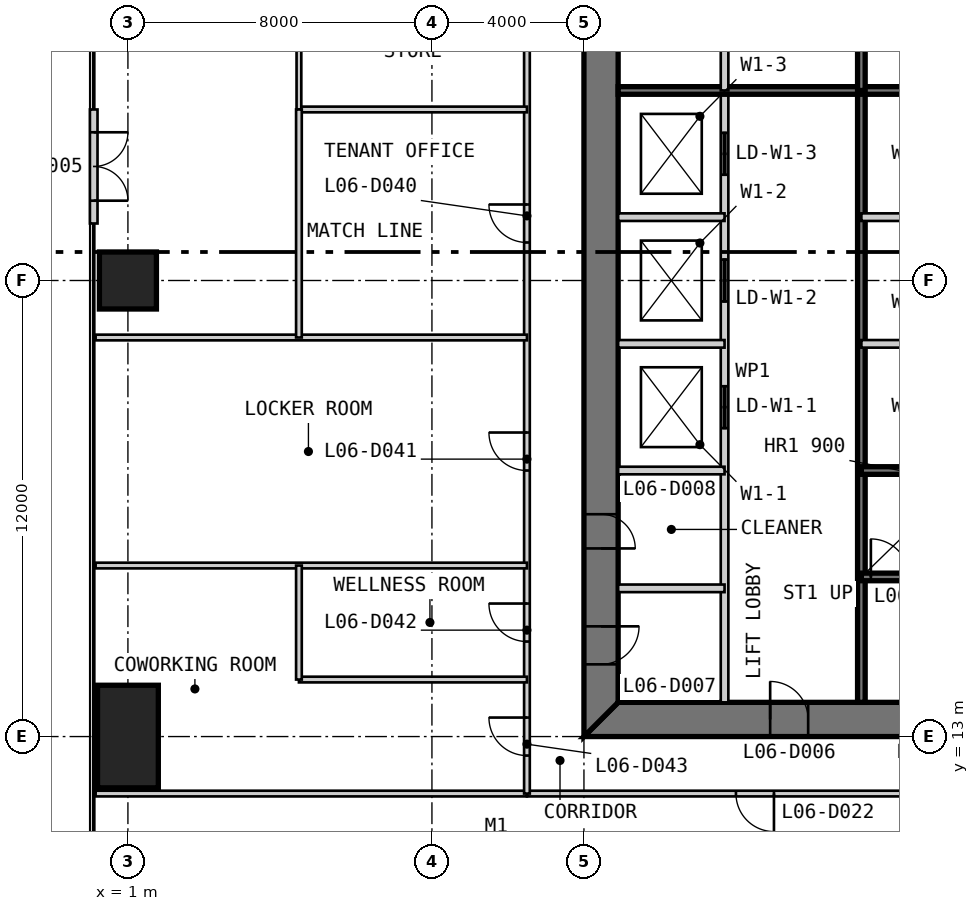
"""IFC4 building model, lengths in metres.
Left out: names, types, materials, properties, quantities, classifications, styles, units other than length and angle.
Written with IfcOpenShell. Run it as: python <this file> out.ifc"""

import sys

from ifc_helpers import new_model, si_unit, direction, frame, frame_2d, origin, origin_2d, place, context, subcontext, project, spatial, polyline, rectangle, outline, extrude, element, fill, save


model = new_model("IFC4")
c1 = context("Model", 3, precision=1e-05, world=origin(), true_north=direction((0.0, 1.0)))
c2 = subcontext(c1, "Body", "Model", "MODEL_VIEW")
j1 = project(units=[si_unit("LENGTHUNIT", "METRE"), si_unit("PLANEANGLEUNIT", "RADIAN")], contexts=[c1])
p1 = place(None, origin())
s1 = spatial("IfcSite", under=j1, at=p1, CompositionType="ELEMENT")
p2 = place(p1, origin())
s2 = spatial("IfcBuilding", under=s1, at=p2, CompositionType="ELEMENT")
p3 = place(p2, frame((0.0, 0.0, 31.0)))
s3 = spatial("IfcBuildingStorey", under=s2, at=p3, CompositionType="ELEMENT", Elevation=31.0)
p4 = place(p3, frame((1.0, 25.0, 0.0), z_axis=(0.0, 0.0, 1.0), x_axis=(1.0, 0.0, 0.0)))
e1 = element("IfcColumn", 1, at=p4, inside=s3, PredefinedType="COLUMN", context=c2, shape_type="SweptSolid", body=[
    extrude(rectangle(XDim=1.5, YDim=1.5, at=origin_2d()), origin(), (0.0, 0.0, 1.0), 4.0),
])
p5 = place(p3, frame((1.0, 13.0, 0.0), z_axis=(0.0, 0.0, 1.0), x_axis=(1.0, 0.0, 0.0)))
e2 = element("IfcColumn", 2, at=p5, inside=s3, PredefinedType="COLUMN", context=c2, shape_type="SweptSolid", body=[
    extrude(rectangle(XDim=1.6, YDim=2.7, at=origin_2d()), origin(), (0.0, 0.0, 1.0), 4.0),
])
p6 = place(p3, frame((13.0, 13.45, 0.0), z_axis=(0.0, 0.0, 1.0), x_axis=(1.0, 0.0, 0.0)))
e3 = element("IfcWall", 3, at=p6, inside=s3, PredefinedType="SHEAR", context=c2, shape_type="SweptSolid", body=[
    extrude(outline(polyline([(0.0, -0.45), (24.0, -0.45), (23.1, 0.45), (0.9, 0.45), (0.0, -0.45)])), origin(), (0.0, 0.0, 1.0), 4.0),
])
p7 = place(p6, frame((4.9, 0.0, 0.0)))
e4 = element("IfcOpeningElement", 4, at=p7, cuts=e3, PredefinedType="OPENING", context=c2, shape_type="SweptSolid", body=[
    extrude(rectangle(XDim=1.0, YDim=2.2, at=frame_2d((0.5, 1.1))), frame((0.0, 0.46, 0.0), z_axis=(0.0, -1.0, 0.0), x_axis=(1.0, 0.0, 0.0)), (0.0, 0.0, 1.0), 0.92),
])
p8 = place(p6, frame((8.9, 0.0, 0.0)))
e5 = element("IfcOpeningElement", 5, at=p8, cuts=e3, PredefinedType="OPENING", context=c2, shape_type="SweptSolid", body=[
    extrude(rectangle(XDim=1.1, YDim=2.2, at=frame_2d((0.55, 1.1))), frame((0.0, 0.46, 0.0), z_axis=(0.0, -1.0, 0.0), x_axis=(1.0, 0.0, 0.0)), (0.0, 0.0, 1.0), 0.92),
])
p9 = place(p6, frame((15.05, 0.0, 0.0)))
e6 = element("IfcOpeningElement", 6, at=p9, cuts=e3, PredefinedType="OPENING", context=c2, shape_type="SweptSolid", body=[
    extrude(rectangle(XDim=0.9, YDim=2.2, at=frame_2d((0.45, 1.1))), frame((0.0, 0.46, 0.0), z_axis=(0.0, -1.0, 0.0), x_axis=(1.0, 0.0, 0.0)), (0.0, 0.0, 1.0), 0.92),
])
p10 = place(p6, frame((17.9, 0.0, 0.0)))
e7 = element("IfcOpeningElement", 7, at=p10, cuts=e3, PredefinedType="OPENING", context=c2, shape_type="SweptSolid", body=[
    extrude(rectangle(XDim=1.0, YDim=2.2, at=frame_2d((0.5, 1.1))), frame((0.0, 0.46, 0.0), z_axis=(0.0, -1.0, 0.0), x_axis=(1.0, 0.0, 0.0)), (0.0, 0.0, 1.0), 0.92),
])
p11 = place(p6, frame((21.4, 0.0, 0.0)))
e8 = element("IfcOpeningElement", 8, at=p11, cuts=e3, PredefinedType="OPENING", context=c2, shape_type="SweptSolid", body=[
    extrude(rectangle(XDim=1.0, YDim=2.2, at=frame_2d((0.5, 1.1))), frame((0.0, 0.46, 0.0), z_axis=(0.0, -1.0, 0.0), x_axis=(1.0, 0.0, 0.0)), (0.0, 0.0, 1.0), 0.92),
])
p12 = place(p3, frame((13.45, 36.1, 0.0), z_axis=(0.0, 0.0, 1.0), x_axis=(0.0, -1.0, 0.0)))
e9 = element("IfcWall", 9, at=p12, inside=s3, PredefinedType="SHEAR", context=c2, shape_type="SweptSolid", body=[
    extrude(outline(polyline([(-0.9, -0.45), (23.1, -0.45), (22.2, 0.45), (0.0, 0.45), (-0.9, -0.45)])), origin(), (0.0, 0.0, 1.0), 4.0),
])
p13 = place(p12, frame((20.2, 0.0, 0.0)))
e10 = element("IfcOpeningElement", 10, at=p13, cuts=e9, PredefinedType="OPENING", context=c2, shape_type="SweptSolid", body=[
    extrude(rectangle(XDim=1.0, YDim=2.2, at=frame_2d((0.5, 1.1))), frame((0.0, 0.46, 0.0), z_axis=(0.0, -1.0, 0.0), x_axis=(1.0, 0.0, 0.0)), (0.0, 0.0, 1.0), 0.92),
])
p14 = place(p12, frame((17.25, 0.0, 0.0)))
e11 = element("IfcOpeningElement", 11, at=p14, cuts=e9, PredefinedType="OPENING", context=c2, shape_type="SweptSolid", body=[
    extrude(rectangle(XDim=0.9, YDim=2.2, at=frame_2d((0.45, 1.1))), frame((0.0, 0.46, 0.0), z_axis=(0.0, -1.0, 0.0), x_axis=(1.0, 0.0, 0.0)), (0.0, 0.0, 1.0), 0.92),
])
p15 = place(p3, frame((0.1, 29.5, 0.0), z_axis=(0.0, 0.0, 1.0), x_axis=(0.0, -1.0, 0.0)))
e12 = element("IfcWall", 12, at=p15, inside=s3, PredefinedType="SOLIDWALL", context=c2, shape_type="SweptSolid", body=[
    extrude(rectangle(XDim=3.0, YDim=0.2, at=frame_2d((1.5, 0.0))), origin(), (0.0, 0.0, 1.0), 3.85),
])
p16 = place(p15, frame((0.6, 0.0, 0.0)))
e13 = element("IfcOpeningElement", 13, at=p16, cuts=e12, PredefinedType="OPENING", context=c2, shape_type="SweptSolid", body=[
    extrude(rectangle(XDim=1.8, YDim=2.4, at=frame_2d((0.9, 1.2))), frame((0.0, 0.11, 0.0), z_axis=(0.0, -1.0, 0.0), x_axis=(1.0, 0.0, 0.0)), (0.0, 0.0, 1.0), 0.22),
])
p17 = place(p3, frame((16.7, 13.9, 0.0), z_axis=(0.0, 0.0, 1.0), x_axis=(0.0, 1.0, 0.0)))
e14 = element("IfcWall", 14, at=p17, inside=s3, PredefinedType="PARTITIONING", context=c2, shape_type="SweptSolid", body=[
    extrude(rectangle(XDim=16.1, YDim=0.2, at=frame_2d((8.05, 0.0))), origin(), (0.0, 0.0, 1.0), 3.8),
])
p18 = place(p17, frame((7.217, 0.0, 0.0)))
e15 = element("IfcOpeningElement", 15, at=p18, cuts=e14, PredefinedType="OPENING", context=c2, shape_type="SweptSolid", body=[
    extrude(rectangle(XDim=1.1, YDim=2.2, at=frame_2d((0.55, 1.1))), frame((0.0, 0.11, 0.0), z_axis=(0.0, -1.0, 0.0), x_axis=(1.0, 0.0, 0.0)), (0.0, 0.0, 1.0), 0.22),
])
p19 = place(p17, frame((10.55, 0.0, 0.0)))
e16 = element("IfcOpeningElement", 16, at=p19, cuts=e14, PredefinedType="OPENING", context=c2, shape_type="SweptSolid", body=[
    extrude(rectangle(XDim=1.1, YDim=2.2, at=frame_2d((0.55, 1.1))), frame((0.0, 0.11, 0.0), z_axis=(0.0, -1.0, 0.0), x_axis=(1.0, 0.0, 0.0)), (0.0, 0.0, 1.0), 0.22),
])
p20 = place(p17, frame((13.883, 0.0, 0.0)))
e17 = element("IfcOpeningElement", 17, at=p20, cuts=e14, PredefinedType="OPENING", context=c2, shape_type="SweptSolid", body=[
    extrude(rectangle(XDim=1.1, YDim=2.2, at=frame_2d((0.55, 1.1))), frame((0.0, 0.11, 0.0), z_axis=(0.0, -1.0, 0.0), x_axis=(1.0, 0.0, 0.0)), (0.0, 0.0, 1.0), 0.22),
])
p21 = place(p3, frame((20.3, 13.9, 0.0), z_axis=(0.0, 0.0, 1.0), x_axis=(0.0, 1.0, 0.0)))
e18 = element("IfcWall", 18, at=p21, inside=s3, PredefinedType="SOLIDWALL", context=c2, shape_type="SweptSolid", body=[
    extrude(rectangle(XDim=16.1, YDim=0.2, at=frame_2d((8.05, 0.0))), origin(), (0.0, 0.0, 1.0), 3.8),
])
for number, where, z_axis, x_axis in (
    (19, (13.9, 16.9, 0.0), (0.0, 0.0, 1.0), (1.0, 0.0, 0.0)),
    (20, (13.9, 20.0, 0.0), (0.0, 0.0, 1.0), (1.0, 0.0, 0.0)),
    (21, (13.9, 23.333, 0.0), (0.0, 0.0, 1.0), (1.0, 0.0, 0.0)),
    (22, (13.9, 26.667, 0.0), (0.0, 0.0, 1.0), (1.0, 0.0, 0.0)),
    (23, (20.3, 23.333, 0.0), (0.0, 0.0, 1.0), (1.0, 0.0, 0.0)),
    (24, (20.3, 26.667, 0.0), (0.0, 0.0, 1.0), (1.0, 0.0, 0.0)),
):
    element("IfcWall", number, at=place(p3, frame(where, z_axis=z_axis, x_axis=x_axis)), inside=s3, PredefinedType="PARTITIONING", context=c2, shape_type="SweptSolid", body=[
        extrude(rectangle(XDim=2.8, YDim=0.2, at=frame_2d((1.4, 0.0))), origin(), (0.0, 0.0, 1.0), 3.8),
    ])
p22 = place(p3, frame((20.3, 17.2, 0.0), z_axis=(0.0, 0.0, 1.0), x_axis=(1.0, 0.0, 0.0)))
e25 = element("IfcWall", 25, at=p22, inside=s3, PredefinedType="SOLIDWALL", context=c2, shape_type="SweptSolid", body=[
    extrude(rectangle(XDim=9.4, YDim=0.2, at=frame_2d((4.7, 0.0))), origin(), (0.0, 0.0, 1.0), 3.8),
])
p23 = place(p22, frame((0.25, 0.0, 0.0)))
e26 = element("IfcOpeningElement", 26, at=p23, cuts=e25, PredefinedType="OPENING", context=c2, shape_type="SweptSolid", body=[
    extrude(rectangle(XDim=1.0, YDim=2.2, at=frame_2d((0.5, 1.1))), frame((0.0, 0.11, 0.0), z_axis=(0.0, -1.0, 0.0), x_axis=(1.0, 0.0, 0.0)), (0.0, 0.0, 1.0), 0.22),
])
for number, where, z_axis, x_axis in (
    (27, (20.3, 20.0, 0.0), (0.0, 0.0, 1.0), (1.0, 0.0, 0.0)),
    (28, (29.7, 30.0, 0.0), (0.0, 0.0, 1.0), (-1.0, 0.0, 0.0)),
):
    element("IfcWall", number, at=place(p3, frame(where, z_axis=z_axis, x_axis=x_axis)), inside=s3, PredefinedType="SOLIDWALL", context=c2, shape_type="SweptSolid", body=[
        extrude(rectangle(XDim=15.8, YDim=0.2, at=frame_2d((7.9, 0.0))), origin(), (0.0, 0.0, 1.0), 3.8),
    ])
p24 = place(p3, frame((20.3, 36.1, 0.0), z_axis=(0.0, 0.0, 1.0), x_axis=(0.0, -1.0, 0.0)))
e29 = element("IfcWall", 29, at=p24, inside=s3, PredefinedType="SOLIDWALL", context=c2, shape_type="SweptSolid", body=[
    extrude(rectangle(XDim=6.1, YDim=0.2, at=frame_2d((3.05, 0.0))), origin(), (0.0, 0.0, 1.0), 3.8),
])
p25 = place(p3, frame((16.7, 36.1, 0.0), z_axis=(0.0, 0.0, 1.0), x_axis=(0.0, -1.0, 0.0)))
e30 = element("IfcWall", 30, at=p25, inside=s3, PredefinedType="PARTITIONING", context=c2, shape_type="SweptSolid", body=[
    extrude(rectangle(XDim=6.1, YDim=0.2, at=frame_2d((3.05, 0.0))), origin(), (0.0, 0.0, 1.0), 3.8),
])
p26 = place(p3, frame((11.5, 11.5, 0.0), z_axis=(0.0, 0.0, 1.0), x_axis=(1.0, 0.0, 0.0)))
e31 = element("IfcWall", 31, at=p26, inside=s3, PredefinedType="PARTITIONING", context=c2, shape_type="SweptSolid", body=[
    extrude(rectangle(XDim=27.0, YDim=0.15, at=frame_2d((13.5, 0.0))), origin(), (0.0, 0.0, 1.0), 3.85),
])
p27 = place(p26, frame((5.5, 0.0, 0.0)))
e32 = element("IfcOpeningElement", 32, at=p27, cuts=e31, PredefinedType="OPENING", context=c2, shape_type="SweptSolid", body=[
    extrude(rectangle(XDim=1.0, YDim=2.2, at=frame_2d((0.5, 1.1))), frame((0.0, 0.085, 0.0), z_axis=(0.0, -1.0, 0.0), x_axis=(1.0, 0.0, 0.0)), (0.0, 0.0, 1.0), 0.17),
])
p28 = place(p26, frame((17.5, 0.0, 0.0)))
e33 = element("IfcOpeningElement", 33, at=p28, cuts=e31, PredefinedType="OPENING", context=c2, shape_type="SweptSolid", body=[
    extrude(rectangle(XDim=1.0, YDim=2.2, at=frame_2d((0.5, 1.1))), frame((0.0, 0.085, 0.0), z_axis=(0.0, -1.0, 0.0), x_axis=(1.0, 0.0, 0.0)), (0.0, 0.0, 1.0), 0.17),
])
p29 = place(p26, frame((23.5, 0.0, 0.0)))
e34 = element("IfcOpeningElement", 34, at=p29, cuts=e31, PredefinedType="OPENING", context=c2, shape_type="SweptSolid", body=[
    extrude(rectangle(XDim=1.0, YDim=2.2, at=frame_2d((0.5, 1.1))), frame((0.0, 0.085, 0.0), z_axis=(0.0, -1.0, 0.0), x_axis=(1.0, 0.0, 0.0)), (0.0, 0.0, 1.0), 0.17),
])
p30 = place(p3, frame((0.15, 11.5, 0.0), z_axis=(0.0, 0.0, 1.0), x_axis=(1.0, 0.0, 0.0)))
e35 = element("IfcWall", 35, at=p30, inside=s3, PredefinedType="PARTITIONING", context=c2, shape_type="SweptSolid", body=[
    extrude(rectangle(XDim=11.35, YDim=0.15, at=frame_2d((5.675, 0.0))), origin(), (0.0, 0.0, 1.0), 3.85),
])
p31 = place(p3, frame((11.5, 38.5, 0.0), z_axis=(0.0, 0.0, 1.0), x_axis=(0.0, -1.0, 0.0)))
e36 = element("IfcWall", 36, at=p31, inside=s3, PredefinedType="PARTITIONING", context=c2, shape_type="SweptSolid", body=[
    extrude(rectangle(XDim=27.0, YDim=0.15, at=frame_2d((13.5, 0.0))), origin(), (0.0, 0.0, 1.0), 3.85),
])
p32 = place(p31, frame((2.5, 0.0, 0.0)))
e37 = element("IfcOpeningElement", 37, at=p32, cuts=e36, PredefinedType="OPENING", context=c2, shape_type="SweptSolid", body=[
    extrude(rectangle(XDim=1.0, YDim=2.2, at=frame_2d((0.5, 1.1))), frame((0.0, 0.085, 0.0), z_axis=(0.0, -1.0, 0.0), x_axis=(1.0, 0.0, 0.0)), (0.0, 0.0, 1.0), 0.17),
])
p33 = place(p31, frame((11.5, 0.0, 0.0)))
e38 = element("IfcOpeningElement", 38, at=p33, cuts=e36, PredefinedType="OPENING", context=c2, shape_type="SweptSolid", body=[
    extrude(rectangle(XDim=1.0, YDim=2.2, at=frame_2d((0.5, 1.1))), frame((0.0, 0.085, 0.0), z_axis=(0.0, -1.0, 0.0), x_axis=(1.0, 0.0, 0.0)), (0.0, 0.0, 1.0), 0.17),
])
p34 = place(p31, frame((17.5, 0.0, 0.0)))
e39 = element("IfcOpeningElement", 39, at=p34, cuts=e36, PredefinedType="OPENING", context=c2, shape_type="SweptSolid", body=[
    extrude(rectangle(XDim=1.0, YDim=2.2, at=frame_2d((0.5, 1.1))), frame((0.0, 0.085, 0.0), z_axis=(0.0, -1.0, 0.0), x_axis=(1.0, 0.0, 0.0)), (0.0, 0.0, 1.0), 0.17),
])
p35 = place(p31, frame((22.0, 0.0, 0.0)))
e40 = element("IfcOpeningElement", 40, at=p35, cuts=e36, PredefinedType="OPENING", context=c2, shape_type="SweptSolid", body=[
    extrude(rectangle(XDim=1.0, YDim=2.2, at=frame_2d((0.5, 1.1))), frame((0.0, 0.085, 0.0), z_axis=(0.0, -1.0, 0.0), x_axis=(1.0, 0.0, 0.0)), (0.0, 0.0, 1.0), 0.17),
])
p36 = place(p31, frame((25.0, 0.0, 0.0)))
e41 = element("IfcOpeningElement", 41, at=p36, cuts=e36, PredefinedType="OPENING", context=c2, shape_type="SweptSolid", body=[
    extrude(rectangle(XDim=1.0, YDim=2.2, at=frame_2d((0.5, 1.1))), frame((0.0, 0.085, 0.0), z_axis=(0.0, -1.0, 0.0), x_axis=(1.0, 0.0, 0.0)), (0.0, 0.0, 1.0), 0.17),
])
p37 = place(p3, frame((5.5, 29.5, 0.0), z_axis=(0.0, 0.0, 1.0), x_axis=(1.0, 0.0, 0.0)))
e42 = element("IfcWall", 42, at=p37, inside=s3, PredefinedType="PARTITIONING", context=c2, shape_type="SweptSolid", body=[
    extrude(rectangle(XDim=6.0, YDim=0.15, at=frame_2d((3.0, 0.0))), origin(), (0.0, 0.0, 1.0), 3.85),
])
for number, where, z_axis, x_axis in (
    (43, (0.15, 23.5, 0.0), (0.0, 0.0, 1.0), (1.0, 0.0, 0.0)),
    (44, (0.15, 17.5, 0.0), (0.0, 0.0, 1.0), (1.0, 0.0, 0.0)),
):
    element("IfcWall", number, at=place(p3, frame(where, z_axis=z_axis, x_axis=x_axis)), inside=s3, PredefinedType="PARTITIONING", context=c2, shape_type="SweptSolid", body=[
        extrude(rectangle(XDim=11.35, YDim=0.15, at=frame_2d((5.675, 0.0))), origin(), (0.0, 0.0, 1.0), 3.85),
    ])
p38 = place(p3, frame((5.5, 14.5, 0.0), z_axis=(0.0, 0.0, 1.0), x_axis=(1.0, 0.0, 0.0)))
e45 = element("IfcWall", 45, at=p38, inside=s3, PredefinedType="PARTITIONING", context=c2, shape_type="SweptSolid", body=[
    extrude(rectangle(XDim=6.0, YDim=0.15, at=frame_2d((3.0, 0.0))), origin(), (0.0, 0.0, 1.0), 3.85),
])
p39 = place(p3, frame((5.5, 32.5, 0.0), z_axis=(0.0, 0.0, 1.0), x_axis=(0.0, -1.0, 0.0)))
e46 = element("IfcWall", 46, at=p39, inside=s3, PredefinedType="PARTITIONING", context=c2, shape_type="SweptSolid", body=[
    extrude(rectangle(XDim=3.0, YDim=0.125, at=frame_2d((1.5, 0.0))), origin(), (0.0, 0.0, 1.0), 3.85),
])
p40 = place(p3, frame((5.5, 29.5, 0.0), z_axis=(0.0, 0.0, 1.0), x_axis=(0.0, -1.0, 0.0)))
e47 = element("IfcWall", 47, at=p40, inside=s3, PredefinedType="PARTITIONING", context=c2, shape_type="SweptSolid", body=[
    extrude(rectangle(XDim=6.0, YDim=0.15, at=frame_2d((3.0, 0.0))), origin(), (0.0, 0.0, 1.0), 3.85),
])
p41 = place(p3, frame((5.5, 17.5, 0.0), z_axis=(0.0, 0.0, 1.0), x_axis=(0.0, -1.0, 0.0)))
e48 = element("IfcWall", 48, at=p41, inside=s3, PredefinedType="PARTITIONING", context=c2, shape_type="SweptSolid", body=[
    extrude(rectangle(XDim=3.0, YDim=0.15, at=frame_2d((1.5, 0.0))), origin(), (0.0, 0.0, 1.0), 3.85),
])
p42 = place(p16, origin())
e49 = element("IfcDoor", 49, at=p42, inside=s3, OperationType="DOUBLE_DOOR_SINGLE_SWING", PredefinedType="DOOR", context=c2, shape_type="SweptSolid", body=[
    extrude(rectangle(XDim=1.8, YDim=2.4, at=frame_2d((0.9, 1.2))), frame((0.0, 0.025, 0.0), z_axis=(0.0, -1.0, 0.0), x_axis=(1.0, 0.0, 0.0)), (0.0, 0.0, 1.0), 0.05),
])
fill(e13, e49)
p43 = place(p7, origin())
e50 = element("IfcDoor", 50, at=p43, inside=s3, OperationType="SINGLE_SWING_LEFT", PredefinedType="DOOR", context=c2, shape_type="SweptSolid", body=[
    extrude(rectangle(XDim=1.0, YDim=2.2, at=frame_2d((0.5, 1.1))), frame((0.0, 0.025, 0.0), z_axis=(0.0, -1.0, 0.0), x_axis=(1.0, 0.0, 0.0)), (0.0, 0.0, 1.0), 0.05),
    extrude(outline(polyline([(0.0, 0.0), (0.04, 0.0), (0.04, 2.16), (0.96, 2.16), (0.96, 0.0), (1.0, 0.0), (1.0, 2.2), (0.0, 2.2), (0.0, 0.0)])), frame((0.0, 0.3, 0.0), z_axis=(0.0, -1.0, 0.0), x_axis=(1.0, 0.0, 0.0)), (0.0, 0.0, 1.0), 0.6),
])
fill(e4, e50)
p44 = place(p13, origin())
e51 = element("IfcDoor", 51, at=p44, inside=s3, OperationType="SINGLE_SWING_LEFT", PredefinedType="DOOR", context=c2, shape_type="SweptSolid", body=[
    extrude(rectangle(XDim=1.0, YDim=2.2, at=frame_2d((0.5, 1.1))), frame((0.0, 0.025, 0.0), z_axis=(0.0, -1.0, 0.0), x_axis=(1.0, 0.0, 0.0)), (0.0, 0.0, 1.0), 0.05),
    extrude(outline(polyline([(0.0, 0.0), (0.04, 0.0), (0.04, 2.16), (0.96, 2.16), (0.96, 0.0), (1.0, 0.0), (1.0, 2.2), (0.0, 2.2), (0.0, 0.0)])), frame((0.0, 0.3, 0.0), z_axis=(0.0, -1.0, 0.0), x_axis=(1.0, 0.0, 0.0)), (0.0, 0.0, 1.0), 0.6),
])
fill(e10, e51)
p45 = place(p14, origin())
e52 = element("IfcDoor", 52, at=p45, inside=s3, OperationType="SINGLE_SWING_RIGHT", PredefinedType="DOOR", context=c2, shape_type="SweptSolid", body=[
    extrude(rectangle(XDim=0.9, YDim=2.2, at=frame_2d((0.45, 1.1))), frame((0.0, 0.025, 0.0), z_axis=(0.0, -1.0, 0.0), x_axis=(1.0, 0.0, 0.0)), (0.0, 0.0, 1.0), 0.05),
    extrude(outline(polyline([(0.0, 0.0), (0.04, 0.0), (0.04, 2.16), (0.86, 2.16), (0.86, 0.0), (0.9, 0.0), (0.9, 2.2), (0.0, 2.2), (0.0, 0.0)])), frame((0.0, 0.3, 0.0), z_axis=(0.0, -1.0, 0.0), x_axis=(1.0, 0.0, 0.0)), (0.0, 0.0, 1.0), 0.6),
])
fill(e11, e52)
p46 = place(p23, origin())
e53 = element("IfcDoor", 53, at=p46, inside=s3, OperationType="SINGLE_SWING_LEFT", PredefinedType="DOOR", context=c2, shape_type="SweptSolid", body=[
    extrude(rectangle(XDim=1.0, YDim=2.2, at=frame_2d((0.5, 1.1))), frame((0.0, 0.025, 0.0), z_axis=(0.0, -1.0, 0.0), x_axis=(1.0, 0.0, 0.0)), (0.0, 0.0, 1.0), 0.05),
])
fill(e26, e53)
p47 = place(p27, frame((1.0, 0.0, 0.0), z_axis=(0.0, 0.0, 1.0), x_axis=(-1.0, 0.0, 0.0)))
e54 = element("IfcDoor", 54, at=p47, inside=s3, OperationType="SINGLE_SWING_LEFT", PredefinedType="DOOR", context=c2, shape_type="SweptSolid", body=[
    extrude(rectangle(XDim=1.0, YDim=2.2, at=frame_2d((0.5, 1.1))), frame((0.0, 0.025, 0.0), z_axis=(0.0, -1.0, 0.0), x_axis=(1.0, 0.0, 0.0)), (0.0, 0.0, 1.0), 0.05),
])
fill(e32, e54)
p48 = place(p33, frame((1.0, 0.0, 0.0), z_axis=(0.0, 0.0, 1.0), x_axis=(-1.0, 0.0, 0.0)))
e55 = element("IfcDoor", 55, at=p48, inside=s3, OperationType="SINGLE_SWING_RIGHT", PredefinedType="DOOR", context=c2, shape_type="SweptSolid", body=[
    extrude(rectangle(XDim=1.0, YDim=2.2, at=frame_2d((0.5, 1.1))), frame((0.0, 0.025, 0.0), z_axis=(0.0, -1.0, 0.0), x_axis=(1.0, 0.0, 0.0)), (0.0, 0.0, 1.0), 0.05),
])
fill(e38, e55)
p49 = place(p34, frame((1.0, 0.0, 0.0), z_axis=(0.0, 0.0, 1.0), x_axis=(-1.0, 0.0, 0.0)))
e56 = element("IfcDoor", 56, at=p49, inside=s3, OperationType="SINGLE_SWING_RIGHT", PredefinedType="DOOR", context=c2, shape_type="SweptSolid", body=[
    extrude(rectangle(XDim=1.0, YDim=2.2, at=frame_2d((0.5, 1.1))), frame((0.0, 0.025, 0.0), z_axis=(0.0, -1.0, 0.0), x_axis=(1.0, 0.0, 0.0)), (0.0, 0.0, 1.0), 0.05),
])
fill(e39, e56)
p50 = place(p35, frame((1.0, 0.0, 0.0), z_axis=(0.0, 0.0, 1.0), x_axis=(-1.0, 0.0, 0.0)))
e57 = element("IfcDoor", 57, at=p50, inside=s3, OperationType="SINGLE_SWING_RIGHT", PredefinedType="DOOR", context=c2, shape_type="SweptSolid", body=[
    extrude(rectangle(XDim=1.0, YDim=2.2, at=frame_2d((0.5, 1.1))), frame((0.0, 0.025, 0.0), z_axis=(0.0, -1.0, 0.0), x_axis=(1.0, 0.0, 0.0)), (0.0, 0.0, 1.0), 0.05),
])
fill(e40, e57)
p51 = place(p36, frame((1.0, 0.0, 0.0), z_axis=(0.0, 0.0, 1.0), x_axis=(-1.0, 0.0, 0.0)))
e58 = element("IfcDoor", 58, at=p51, inside=s3, OperationType="SINGLE_SWING_RIGHT", PredefinedType="DOOR", context=c2, shape_type="SweptSolid", body=[
    extrude(rectangle(XDim=1.0, YDim=2.2, at=frame_2d((0.5, 1.1))), frame((0.0, 0.025, 0.0), z_axis=(0.0, -1.0, 0.0), x_axis=(1.0, 0.0, 0.0)), (0.0, 0.0, 1.0), 0.05),
])
fill(e41, e58)
p52 = place(p18, origin())
e59 = element("IfcDoor", 59, at=p52, inside=s3, OperationType="DOUBLE_DOOR_SLIDING", PredefinedType="DOOR", context=c2, shape_type="SweptSolid", body=[
    extrude(rectangle(XDim=1.1, YDim=2.2, at=frame_2d((0.55, 1.1))), frame((0.0, 0.025, 0.0), z_axis=(0.0, -1.0, 0.0), x_axis=(1.0, 0.0, 0.0)), (0.0, 0.0, 1.0), 0.05),
])
fill(e15, e59)
p53 = place(p19, origin())
e60 = element("IfcDoor", 60, at=p53, inside=s3, OperationType="DOUBLE_DOOR_SLIDING", PredefinedType="DOOR", context=c2, shape_type="SweptSolid", body=[
    extrude(rectangle(XDim=1.1, YDim=2.2, at=frame_2d((0.55, 1.1))), frame((0.0, 0.025, 0.0), z_axis=(0.0, -1.0, 0.0), x_axis=(1.0, 0.0, 0.0)), (0.0, 0.0, 1.0), 0.05),
])
fill(e16, e60)
p54 = place(p20, origin())
e61 = element("IfcDoor", 61, at=p54, inside=s3, OperationType="DOUBLE_DOOR_SLIDING", PredefinedType="DOOR", context=c2, shape_type="SweptSolid", body=[
    extrude(rectangle(XDim=1.1, YDim=2.2, at=frame_2d((0.55, 1.1))), frame((0.0, 0.025, 0.0), z_axis=(0.0, -1.0, 0.0), x_axis=(1.0, 0.0, 0.0)), (0.0, 0.0, 1.0), 0.05),
])
fill(e17, e61)
save(model, sys.argv[1])
